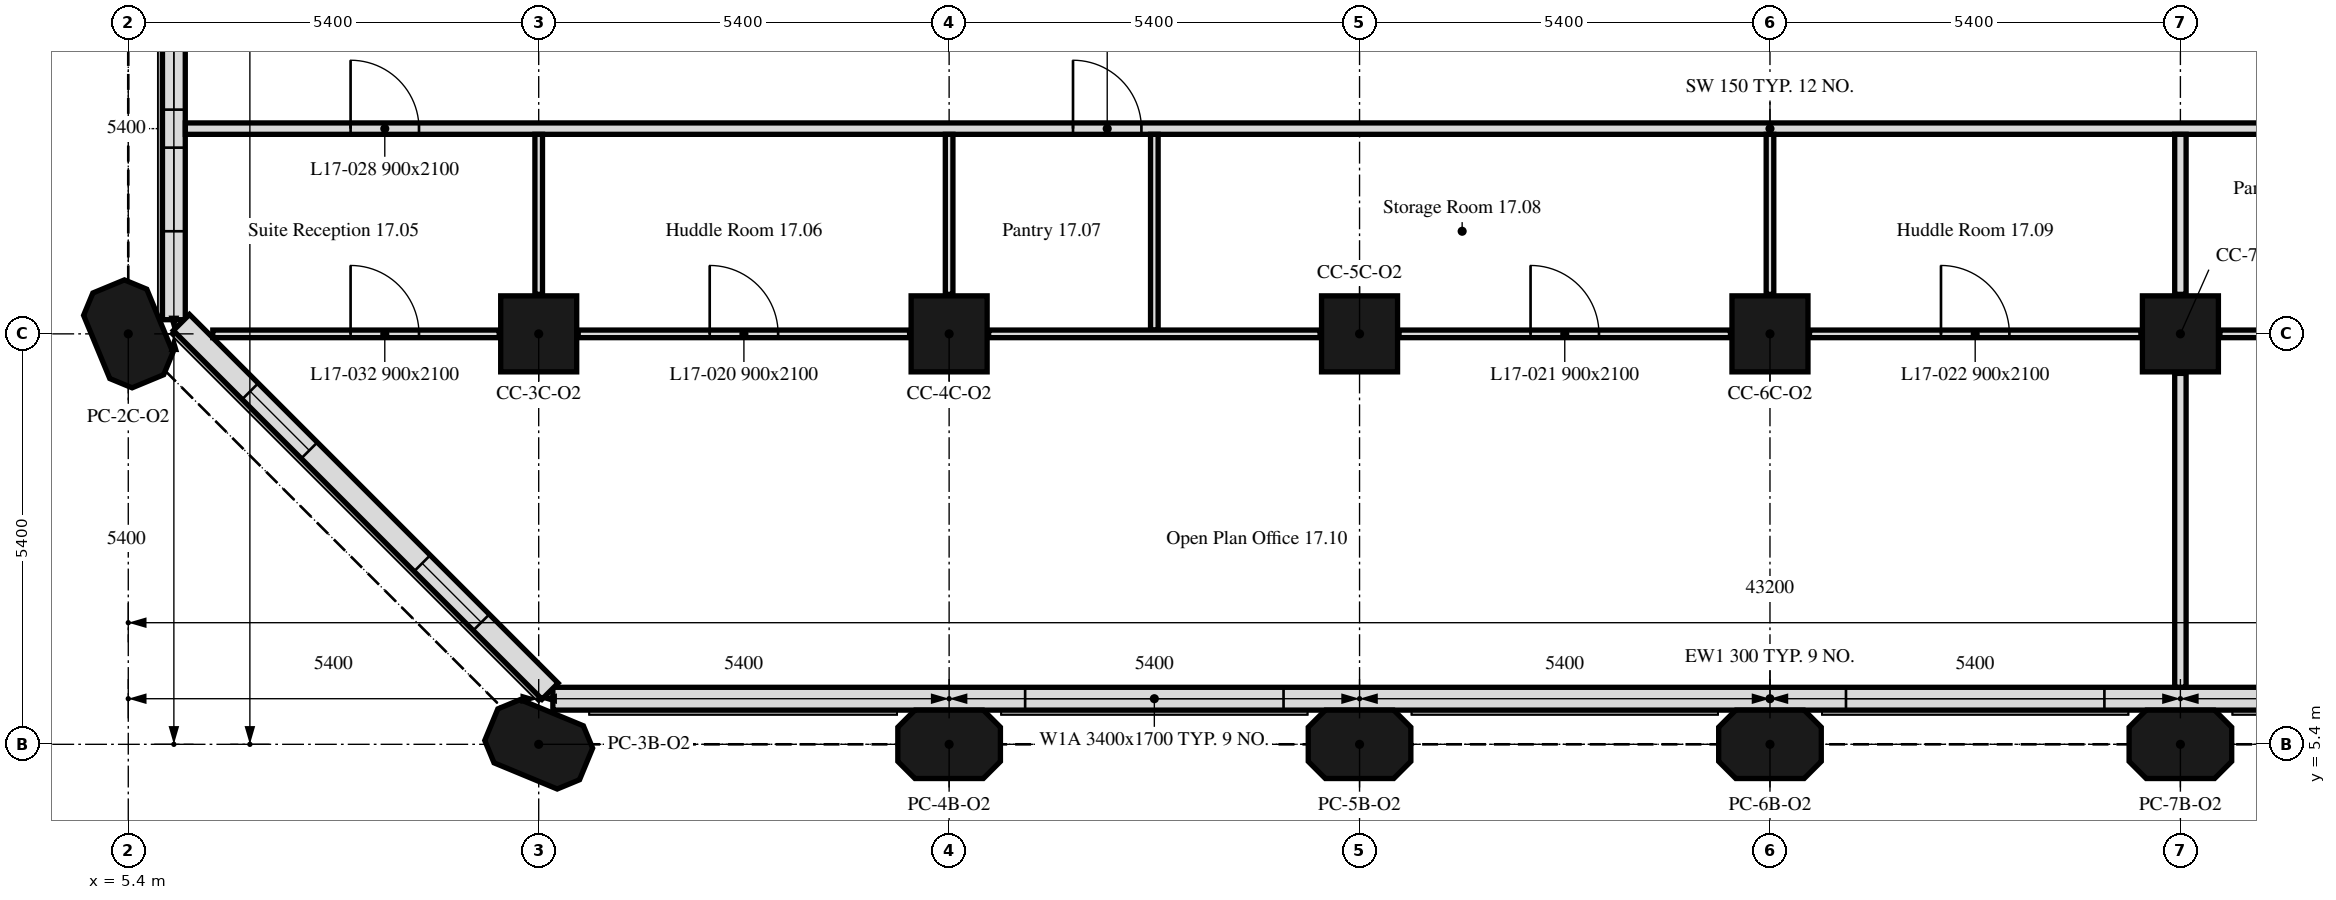
"""IFC4 building model, lengths in metres.
Left out: names, types, materials, properties, quantities, classifications, styles, units other than length and angle.
Written with IfcOpenShell. Run it as: python <this file> out.ifc"""

import sys

from ifc_helpers import new_model, si_unit, direction, frame, frame_2d, origin, origin_2d, place, context, subcontext, project, spatial, polyline, rectangle, outline, extrude, element, fill, save


model = new_model("IFC4")
c1 = context("Model", 3, precision=1e-05, world=origin(), true_north=direction((0.0, 1.0)))
c2 = subcontext(c1, "Body", "Model", "MODEL_VIEW")
j1 = project(units=[si_unit("LENGTHUNIT", "METRE"), si_unit("PLANEANGLEUNIT", "RADIAN")], contexts=[c1])
p1 = place(None, origin())
s1 = spatial("IfcSite", under=j1, at=p1, CompositionType="ELEMENT")
p2 = place(p1, origin())
s2 = spatial("IfcBuilding", under=s1, at=p2, CompositionType="ELEMENT")
p3 = place(p2, frame((0.0, 0.0, 76.4)))
s3 = spatial("IfcBuildingStorey", under=s2, at=p3, CompositionType="ELEMENT", Elevation=76.4)
for number, where, z_axis, x_axis in (
    (1, (10.8, 5.4, 0.0), (0.0, 0.0, 1.0), (-0.924, 0.383, 0.0)),
    (2, (16.2, 5.4, 0.0), (0.0, 0.0, 1.0), (1.0, 0.0, 0.0)),
    (3, (21.6, 5.4, 0.0), (0.0, 0.0, 1.0), (1.0, 0.0, 0.0)),
    (4, (27.0, 5.4, 0.0), (0.0, 0.0, 1.0), (1.0, 0.0, 0.0)),
    (5, (32.4, 5.4, 0.0), (0.0, 0.0, 1.0), (1.0, 0.0, 0.0)),
    (6, (5.4, 10.8, 0.0), (0.0, 0.0, 1.0), (-0.383, 0.924, 0.0)),
):
    element("IfcColumn", number, at=place(p3, frame(where, z_axis=z_axis, x_axis=x_axis)), inside=s3, PredefinedType="COLUMN", context=c2, shape_type="SweptSolid", body=[
        extrude(outline(polyline([(-0.45, -0.45), (0.45, -0.45), (0.675, -0.225), (0.675, 0.225), (0.45, 0.45), (-0.45, 0.45), (-0.675, 0.225), (-0.675, -0.225), (-0.45, -0.45)])), origin(), (0.0, 0.0, 1.0), 3.5),
    ])
for number, where, z_axis, x_axis in (
    (7, (10.8, 10.8, 0.0), (0.0, 0.0, 1.0), (1.0, 0.0, 0.0)),
    (8, (16.2, 10.8, 0.0), (0.0, 0.0, 1.0), (1.0, 0.0, 0.0)),
    (9, (21.6, 10.8, 0.0), (0.0, 0.0, 1.0), (1.0, 0.0, 0.0)),
    (10, (27.0, 10.8, 0.0), (0.0, 0.0, 1.0), (1.0, 0.0, 0.0)),
    (11, (32.4, 10.8, 0.0), (0.0, 0.0, 1.0), (1.0, 0.0, 0.0)),
):
    element("IfcColumn", number, at=place(p3, frame(where, z_axis=z_axis, x_axis=x_axis)), inside=s3, PredefinedType="COLUMN", context=c2, shape_type="SweptSolid", body=[
        extrude(rectangle(XDim=1.0, YDim=1.0, at=origin_2d()), origin(), (0.0, 0.0, 1.0), 3.5),
    ])
p4 = place(p3, frame((10.986, 6.0, 0.0), z_axis=(0.0, 0.0, 1.0), x_axis=(1.0, 0.0, 0.0)))
e12 = element("IfcWall", 12, at=p4, inside=s3, PredefinedType="SOLIDWALL", context=c2, shape_type="SweptSolid", body=[
    extrude(rectangle(XDim=32.027, YDim=0.3, at=frame_2d((16.014, 0.0))), origin(), (0.0, 0.0, 1.0), 3.5),
])
p5 = place(p4, frame((6.214, 0.0, 0.9)))
e13 = element("IfcOpeningElement", 13, at=p5, cuts=e12, PredefinedType="OPENING", context=c2, shape_type="SweptSolid", body=[
    extrude(rectangle(XDim=3.4, YDim=1.7, at=frame_2d((1.7, 0.85))), frame((0.0, 0.16, 0.0), z_axis=(0.0, -1.0, 0.0), x_axis=(1.0, 0.0, 0.0)), (0.0, 0.0, 1.0), 0.32),
])
p6 = place(p4, frame((17.014, 0.0, 0.9)))
e14 = element("IfcOpeningElement", 14, at=p6, cuts=e12, PredefinedType="OPENING", context=c2, shape_type="SweptSolid", body=[
    extrude(rectangle(XDim=3.4, YDim=1.7, at=frame_2d((1.7, 0.85))), frame((0.0, 0.16, 0.0), z_axis=(0.0, -1.0, 0.0), x_axis=(1.0, 0.0, 0.0)), (0.0, 0.0, 1.0), 0.32),
])
p7 = place(p4, frame((27.814, 0.0, 0.9)))
e15 = element("IfcOpeningElement", 15, at=p7, cuts=e12, PredefinedType="OPENING", context=c2, shape_type="SweptSolid", body=[
    extrude(rectangle(XDim=3.4, YDim=1.7, at=frame_2d((1.7, 0.85))), frame((0.0, 0.16, 0.0), z_axis=(0.0, -1.0, 0.0), x_axis=(1.0, 0.0, 0.0)), (0.0, 0.0, 1.0), 0.32),
])
p8 = place(p3, frame((6.0, 16.2, 0.0), z_axis=(0.0, 0.0, 1.0), x_axis=(0.0, -1.0, 0.0)))
e16 = element("IfcWall", 16, at=p8, inside=s3, PredefinedType="SOLIDWALL", context=c2, shape_type="SweptSolid", body=[
    extrude(rectangle(XDim=5.214, YDim=0.3, at=frame_2d((2.607, 0.0))), origin(), (0.0, 0.0, 1.0), 3.5),
])
p9 = place(p8, frame((1.35, 0.0, 0.9)))
e17 = element("IfcOpeningElement", 17, at=p9, cuts=e16, PredefinedType="OPENING", context=c2, shape_type="SweptSolid", body=[
    extrude(rectangle(XDim=1.1, YDim=1.7, at=frame_2d((0.55, 0.85))), frame((0.0, 0.16, 0.0), z_axis=(0.0, -1.0, 0.0), x_axis=(1.0, 0.0, 0.0)), (0.0, 0.0, 1.0), 0.32),
])
p10 = place(p8, frame((2.95, 0.0, 0.9)))
e18 = element("IfcOpeningElement", 18, at=p10, cuts=e16, PredefinedType="OPENING", context=c2, shape_type="SweptSolid", body=[
    extrude(rectangle(XDim=1.1, YDim=1.7, at=frame_2d((0.55, 0.85))), frame((0.0, 0.16, 0.0), z_axis=(0.0, -1.0, 0.0), x_axis=(1.0, 0.0, 0.0)), (0.0, 0.0, 1.0), 0.32),
])
p11 = place(p3, frame((6.099, 10.949, 0.0), z_axis=(0.0, 0.0, 1.0), x_axis=(0.707106781187, -0.707106781187, 0.0)))
e19 = element("IfcWall", 19, at=p11, inside=s3, PredefinedType="SOLIDWALL", context=c2, shape_type="SweptSolid", body=[
    extrude(rectangle(XDim=6.86, YDim=0.3, at=frame_2d((3.43, 0.0))), origin(), (0.0, 0.0, 1.0), 3.5),
])
p12 = place(p11, frame((1.28, 0.0, 0.9)))
e20 = element("IfcOpeningElement", 20, at=p12, cuts=e19, PredefinedType="OPENING", context=c2, shape_type="SweptSolid", body=[
    extrude(rectangle(XDim=1.1, YDim=1.7, at=frame_2d((0.55, 0.85))), frame((0.0, 0.16, 0.0), z_axis=(0.0, -1.0, 0.0), x_axis=(1.0, 0.0, 0.0)), (0.0, 0.0, 1.0), 0.32),
])
p13 = place(p11, frame((4.48, 0.0, 0.9)))
e21 = element("IfcOpeningElement", 21, at=p13, cuts=e19, PredefinedType="OPENING", context=c2, shape_type="SweptSolid", body=[
    extrude(rectangle(XDim=1.1, YDim=1.7, at=frame_2d((0.55, 0.85))), frame((0.0, 0.16, 0.0), z_axis=(0.0, -1.0, 0.0), x_axis=(1.0, 0.0, 0.0)), (0.0, 0.0, 1.0), 0.32),
])
p14 = place(p3, frame((6.151, 13.5, 0.0), z_axis=(0.0, 0.0, 1.0), x_axis=(1.0, 0.0, 0.0)))
e22 = element("IfcWall", 22, at=p14, inside=s3, PredefinedType="PARTITIONING", context=c2, shape_type="SweptSolid", body=[
    extrude(rectangle(XDim=41.698, YDim=0.15, at=frame_2d((20.849, 0.0))), origin(), (0.0, 0.0, 1.0), 3.5),
])
p15 = place(p14, frame((11.679, 0.0, 0.0)))
e23 = element("IfcOpeningElement", 23, at=p15, cuts=e22, PredefinedType="OPENING", context=c2, shape_type="SweptSolid", body=[
    extrude(rectangle(XDim=0.9, YDim=2.1, at=frame_2d((0.45, 1.05))), frame((0.0, 0.075, 0.0), z_axis=(0.0, -1.0, 0.0), x_axis=(1.0, 0.0, 0.0)), (0.0, 0.0, 1.0), 0.15),
])
p16 = place(p14, frame((27.879, 0.0, 0.0)))
e24 = element("IfcOpeningElement", 24, at=p16, cuts=e22, PredefinedType="OPENING", context=c2, shape_type="SweptSolid", body=[
    extrude(rectangle(XDim=0.9, YDim=2.1, at=frame_2d((0.45, 1.05))), frame((0.0, 0.075, 0.0), z_axis=(0.0, -1.0, 0.0), x_axis=(1.0, 0.0, 0.0)), (0.0, 0.0, 1.0), 0.15),
])
p17 = place(p14, frame((29.119, 0.0, 0.0)))
e25 = element("IfcOpeningElement", 25, at=p17, cuts=e22, PredefinedType="OPENING", context=c2, shape_type="SweptSolid", body=[
    extrude(rectangle(XDim=0.9, YDim=2.1, at=frame_2d((0.45, 1.05))), frame((0.0, 0.075, 0.0), z_axis=(0.0, -1.0, 0.0), x_axis=(1.0, 0.0, 0.0)), (0.0, 0.0, 1.0), 0.15),
])
p18 = place(p14, frame((33.279, 0.0, 0.0)))
e26 = element("IfcOpeningElement", 26, at=p18, cuts=e22, PredefinedType="OPENING", context=c2, shape_type="SweptSolid", body=[
    extrude(rectangle(XDim=0.9, YDim=2.1, at=frame_2d((0.45, 1.05))), frame((0.0, 0.075, 0.0), z_axis=(0.0, -1.0, 0.0), x_axis=(1.0, 0.0, 0.0)), (0.0, 0.0, 1.0), 0.15),
])
p19 = place(p14, frame((2.174, 0.0, 0.0)))
e27 = element("IfcOpeningElement", 27, at=p19, cuts=e22, PredefinedType="OPENING", context=c2, shape_type="SweptSolid", body=[
    extrude(rectangle(XDim=0.9, YDim=2.1, at=frame_2d((0.45, 1.05))), frame((0.0, 0.075, 0.0), z_axis=(0.0, -1.0, 0.0), x_axis=(1.0, 0.0, 0.0)), (0.0, 0.0, 1.0), 0.15),
])
p20 = place(p14, frame((34.519, 0.0, 0.0)))
e28 = element("IfcOpeningElement", 28, at=p20, cuts=e22, PredefinedType="OPENING", context=c2, shape_type="SweptSolid", body=[
    extrude(rectangle(XDim=0.9, YDim=2.1, at=frame_2d((0.45, 1.05))), frame((0.0, 0.075, 0.0), z_axis=(0.0, -1.0, 0.0), x_axis=(1.0, 0.0, 0.0)), (0.0, 0.0, 1.0), 0.15),
])
p21 = place(p3, frame((6.512, 10.8, 0.0), z_axis=(0.0, 0.0, 1.0), x_axis=(1.0, 0.0, 0.0)))
e29 = element("IfcWall", 29, at=p21, inside=s3, PredefinedType="PARTITIONING", context=c2, shape_type="SweptSolid", body=[
    extrude(rectangle(XDim=3.768, YDim=0.1, at=frame_2d((1.884, 0.0))), origin(), (0.0, 0.0, 1.0), 3.5),
])
p22 = place(p21, frame((1.813, 0.0, 0.0)))
e30 = element("IfcOpeningElement", 30, at=p22, cuts=e29, PredefinedType="OPENING", context=c2, shape_type="SweptSolid", body=[
    extrude(rectangle(XDim=0.9, YDim=2.1, at=frame_2d((0.45, 1.05))), frame((0.0, 0.05, 0.0), z_axis=(0.0, -1.0, 0.0), x_axis=(1.0, 0.0, 0.0)), (0.0, 0.0, 1.0), 0.1),
])
p23 = place(p3, frame((10.8, 11.32, 0.0), z_axis=(0.0, 0.0, 1.0), x_axis=(0.0, 1.0, 0.0)))
e31 = element("IfcWall", 31, at=p23, inside=s3, PredefinedType="PARTITIONING", context=c2, shape_type="SweptSolid", body=[
    extrude(rectangle(XDim=2.105, YDim=0.1, at=frame_2d((1.052, 0.0))), origin(), (0.0, 0.0, 1.0), 3.5),
])
p24 = place(p3, frame((11.32, 10.8, 0.0), z_axis=(0.0, 0.0, 1.0), x_axis=(1.0, 0.0, 0.0)))
e32 = element("IfcWall", 32, at=p24, inside=s3, PredefinedType="PARTITIONING", context=c2, shape_type="SweptSolid", body=[
    extrude(rectangle(XDim=4.36, YDim=0.1, at=frame_2d((2.18, 0.0))), origin(), (0.0, 0.0, 1.0), 3.5),
])
p25 = place(p24, frame((1.73, 0.0, 0.0)))
e33 = element("IfcOpeningElement", 33, at=p25, cuts=e32, PredefinedType="OPENING", context=c2, shape_type="SweptSolid", body=[
    extrude(rectangle(XDim=0.9, YDim=2.1, at=frame_2d((0.45, 1.05))), frame((0.0, 0.05, 0.0), z_axis=(0.0, -1.0, 0.0), x_axis=(1.0, 0.0, 0.0)), (0.0, 0.0, 1.0), 0.1),
])
p26 = place(p3, frame((16.2, 11.32, 0.0), z_axis=(0.0, 0.0, 1.0), x_axis=(0.0, 1.0, 0.0)))
e34 = element("IfcWall", 34, at=p26, inside=s3, PredefinedType="PARTITIONING", context=c2, shape_type="SweptSolid", body=[
    extrude(rectangle(XDim=2.105, YDim=0.1, at=frame_2d((1.052, 0.0))), origin(), (0.0, 0.0, 1.0), 3.5),
])
p27 = place(p3, frame((18.9, 10.85, 0.0), z_axis=(0.0, 0.0, 1.0), x_axis=(0.0, 1.0, 0.0)))
e35 = element("IfcWall", 35, at=p27, inside=s3, PredefinedType="PARTITIONING", context=c2, shape_type="SweptSolid", body=[
    extrude(rectangle(XDim=2.575, YDim=0.1, at=frame_2d((1.288, 0.0))), origin(), (0.0, 0.0, 1.0), 3.5),
])
p28 = place(p3, frame((16.72, 10.8, 0.0), z_axis=(0.0, 0.0, 1.0), x_axis=(1.0, 0.0, 0.0)))
e36 = element("IfcWall", 36, at=p28, inside=s3, PredefinedType="PARTITIONING", context=c2, shape_type="SweptSolid", body=[
    extrude(rectangle(XDim=4.36, YDim=0.1, at=frame_2d((2.18, 0.0))), origin(), (0.0, 0.0, 1.0), 3.5),
])
p29 = place(p3, frame((22.12, 10.8, 0.0), z_axis=(0.0, 0.0, 1.0), x_axis=(1.0, 0.0, 0.0)))
e37 = element("IfcWall", 37, at=p29, inside=s3, PredefinedType="PARTITIONING", context=c2, shape_type="SweptSolid", body=[
    extrude(rectangle(XDim=4.36, YDim=0.1, at=frame_2d((2.18, 0.0))), origin(), (0.0, 0.0, 1.0), 3.5),
])
p30 = place(p29, frame((1.73, 0.0, 0.0)))
e38 = element("IfcOpeningElement", 38, at=p30, cuts=e37, PredefinedType="OPENING", context=c2, shape_type="SweptSolid", body=[
    extrude(rectangle(XDim=0.9, YDim=2.1, at=frame_2d((0.45, 1.05))), frame((0.0, 0.05, 0.0), z_axis=(0.0, -1.0, 0.0), x_axis=(1.0, 0.0, 0.0)), (0.0, 0.0, 1.0), 0.1),
])
p31 = place(p3, frame((27.0, 11.32, 0.0), z_axis=(0.0, 0.0, 1.0), x_axis=(0.0, 1.0, 0.0)))
e39 = element("IfcWall", 39, at=p31, inside=s3, PredefinedType="PARTITIONING", context=c2, shape_type="SweptSolid", body=[
    extrude(rectangle(XDim=2.105, YDim=0.1, at=frame_2d((1.052, 0.0))), origin(), (0.0, 0.0, 1.0), 3.5),
])
p32 = place(p3, frame((27.52, 10.8, 0.0), z_axis=(0.0, 0.0, 1.0), x_axis=(1.0, 0.0, 0.0)))
e40 = element("IfcWall", 40, at=p32, inside=s3, PredefinedType="PARTITIONING", context=c2, shape_type="SweptSolid", body=[
    extrude(rectangle(XDim=4.36, YDim=0.1, at=frame_2d((2.18, 0.0))), origin(), (0.0, 0.0, 1.0), 3.5),
])
p33 = place(p32, frame((1.73, 0.0, 0.0)))
e41 = element("IfcOpeningElement", 41, at=p33, cuts=e40, PredefinedType="OPENING", context=c2, shape_type="SweptSolid", body=[
    extrude(rectangle(XDim=0.9, YDim=2.1, at=frame_2d((0.45, 1.05))), frame((0.0, 0.05, 0.0), z_axis=(0.0, -1.0, 0.0), x_axis=(1.0, 0.0, 0.0)), (0.0, 0.0, 1.0), 0.1),
])
p34 = place(p3, frame((32.4, 11.32, 0.0), z_axis=(0.0, 0.0, 1.0), x_axis=(0.0, 1.0, 0.0)))
e42 = element("IfcWall", 42, at=p34, inside=s3, PredefinedType="PARTITIONING", context=c2, shape_type="SweptSolid", body=[
    extrude(rectangle(XDim=2.105, YDim=0.15, at=frame_2d((1.052, 0.0))), origin(), (0.0, 0.0, 1.0), 3.5),
])
p35 = place(p3, frame((32.4, 6.151, 0.0), z_axis=(0.0, 0.0, 1.0), x_axis=(0.0, 1.0, 0.0)))
e43 = element("IfcWall", 43, at=p35, inside=s3, PredefinedType="PARTITIONING", context=c2, shape_type="SweptSolid", body=[
    extrude(rectangle(XDim=4.129, YDim=0.15, at=frame_2d((2.064, 0.0))), origin(), (0.0, 0.0, 1.0), 3.5),
])
p36 = place(p3, frame((32.92, 10.8, 0.0), z_axis=(0.0, 0.0, 1.0), x_axis=(1.0, 0.0, 0.0)))
e44 = element("IfcWall", 44, at=p36, inside=s3, PredefinedType="PARTITIONING", context=c2, shape_type="SweptSolid", body=[
    extrude(rectangle(XDim=4.36, YDim=0.1, at=frame_2d((2.18, 0.0))), origin(), (0.0, 0.0, 1.0), 3.5),
])
p37 = place(p5, origin())
e45 = element("IfcWindow", 45, at=p37, inside=s3, PartitioningType="SINGLE_PANEL", PredefinedType="WINDOW", context=c2, shape_type="SweptSolid", body=[
    extrude(rectangle(XDim=3.4, YDim=1.7, at=frame_2d((1.7, 0.85))), frame((0.0, 0.03, 0.0), z_axis=(0.0, -1.0, 0.0), x_axis=(1.0, 0.0, 0.0)), (0.0, 0.0, 1.0), 0.06),
])
fill(e13, e45)
p38 = place(p6, origin())
e46 = element("IfcWindow", 46, at=p38, inside=s3, PartitioningType="SINGLE_PANEL", PredefinedType="WINDOW", context=c2, shape_type="SweptSolid", body=[
    extrude(rectangle(XDim=3.4, YDim=1.7, at=frame_2d((1.7, 0.85))), frame((0.0, 0.03, 0.0), z_axis=(0.0, -1.0, 0.0), x_axis=(1.0, 0.0, 0.0)), (0.0, 0.0, 1.0), 0.06),
])
fill(e14, e46)
p39 = place(p9, origin())
e47 = element("IfcWindow", 47, at=p39, inside=s3, PartitioningType="SINGLE_PANEL", PredefinedType="WINDOW", context=c2, shape_type="SweptSolid", body=[
    extrude(rectangle(XDim=1.1, YDim=1.7, at=frame_2d((0.55, 0.85))), frame((0.0, 0.03, 0.0), z_axis=(0.0, -1.0, 0.0), x_axis=(1.0, 0.0, 0.0)), (0.0, 0.0, 1.0), 0.06),
])
fill(e17, e47)
p40 = place(p10, origin())
e48 = element("IfcWindow", 48, at=p40, inside=s3, PartitioningType="SINGLE_PANEL", PredefinedType="WINDOW", context=c2, shape_type="SweptSolid", body=[
    extrude(rectangle(XDim=1.1, YDim=1.7, at=frame_2d((0.55, 0.85))), frame((0.0, 0.03, 0.0), z_axis=(0.0, -1.0, 0.0), x_axis=(1.0, 0.0, 0.0)), (0.0, 0.0, 1.0), 0.06),
])
fill(e18, e48)
p41 = place(p12, origin())
e49 = element("IfcWindow", 49, at=p41, inside=s3, PartitioningType="SINGLE_PANEL", PredefinedType="WINDOW", context=c2, shape_type="SweptSolid", body=[
    extrude(rectangle(XDim=1.1, YDim=1.7, at=frame_2d((0.55, 0.85))), frame((0.0, 0.03, 0.0), z_axis=(0.0, -1.0, 0.0), x_axis=(1.0, 0.0, 0.0)), (0.0, 0.0, 1.0), 0.06),
])
fill(e20, e49)
p42 = place(p13, origin())
e50 = element("IfcWindow", 50, at=p42, inside=s3, PartitioningType="SINGLE_PANEL", PredefinedType="WINDOW", context=c2, shape_type="SweptSolid", body=[
    extrude(rectangle(XDim=1.1, YDim=1.7, at=frame_2d((0.55, 0.85))), frame((0.0, 0.03, 0.0), z_axis=(0.0, -1.0, 0.0), x_axis=(1.0, 0.0, 0.0)), (0.0, 0.0, 1.0), 0.06),
])
fill(e21, e50)
p43 = place(p15, origin())
e51 = element("IfcDoor", 51, at=p43, inside=s3, OperationType="SINGLE_SWING_RIGHT", PredefinedType="DOOR", context=c2, shape_type="SweptSolid", body=[
    extrude(rectangle(XDim=0.9, YDim=2.1, at=frame_2d((0.45, 1.05))), frame((0.0, 0.025, 0.0), z_axis=(0.0, -1.0, 0.0), x_axis=(1.0, 0.0, 0.0)), (0.0, 0.0, 1.0), 0.05),
])
fill(e23, e51)
p44 = place(p25, origin())
e52 = element("IfcDoor", 52, at=p44, inside=s3, OperationType="SINGLE_SWING_RIGHT", PredefinedType="DOOR", context=c2, shape_type="SweptSolid", body=[
    extrude(rectangle(XDim=0.9, YDim=2.1, at=frame_2d((0.45, 1.05))), frame((0.0, 0.025, 0.0), z_axis=(0.0, -1.0, 0.0), x_axis=(1.0, 0.0, 0.0)), (0.0, 0.0, 1.0), 0.05),
])
fill(e33, e52)
p45 = place(p30, origin())
e53 = element("IfcDoor", 53, at=p45, inside=s3, OperationType="SINGLE_SWING_LEFT", PredefinedType="DOOR", context=c2, shape_type="SweptSolid", body=[
    extrude(rectangle(XDim=0.9, YDim=2.1, at=frame_2d((0.45, 1.05))), frame((0.0, 0.025, 0.0), z_axis=(0.0, -1.0, 0.0), x_axis=(1.0, 0.0, 0.0)), (0.0, 0.0, 1.0), 0.05),
])
fill(e38, e53)
p46 = place(p33, origin())
e54 = element("IfcDoor", 54, at=p46, inside=s3, OperationType="SINGLE_SWING_RIGHT", PredefinedType="DOOR", context=c2, shape_type="SweptSolid", body=[
    extrude(rectangle(XDim=0.9, YDim=2.1, at=frame_2d((0.45, 1.05))), frame((0.0, 0.025, 0.0), z_axis=(0.0, -1.0, 0.0), x_axis=(1.0, 0.0, 0.0)), (0.0, 0.0, 1.0), 0.05),
])
fill(e41, e54)
p47 = place(p19, origin())
e55 = element("IfcDoor", 55, at=p47, inside=s3, OperationType="SINGLE_SWING_RIGHT", PredefinedType="DOOR", context=c2, shape_type="SweptSolid", body=[
    extrude(rectangle(XDim=0.9, YDim=2.1, at=frame_2d((0.45, 1.05))), frame((0.0, 0.025, 0.0), z_axis=(0.0, -1.0, 0.0), x_axis=(1.0, 0.0, 0.0)), (0.0, 0.0, 1.0), 0.05),
])
fill(e27, e55)
p48 = place(p22, origin())
e56 = element("IfcDoor", 56, at=p48, inside=s3, OperationType="SINGLE_SWING_LEFT", PredefinedType="DOOR", context=c2, shape_type="SweptSolid", body=[
    extrude(rectangle(XDim=0.9, YDim=2.1, at=frame_2d((0.45, 1.05))), frame((0.0, 0.025, 0.0), z_axis=(0.0, -1.0, 0.0), x_axis=(1.0, 0.0, 0.0)), (0.0, 0.0, 1.0), 0.05),
])
fill(e30, e56)
save(model, sys.argv[1])
